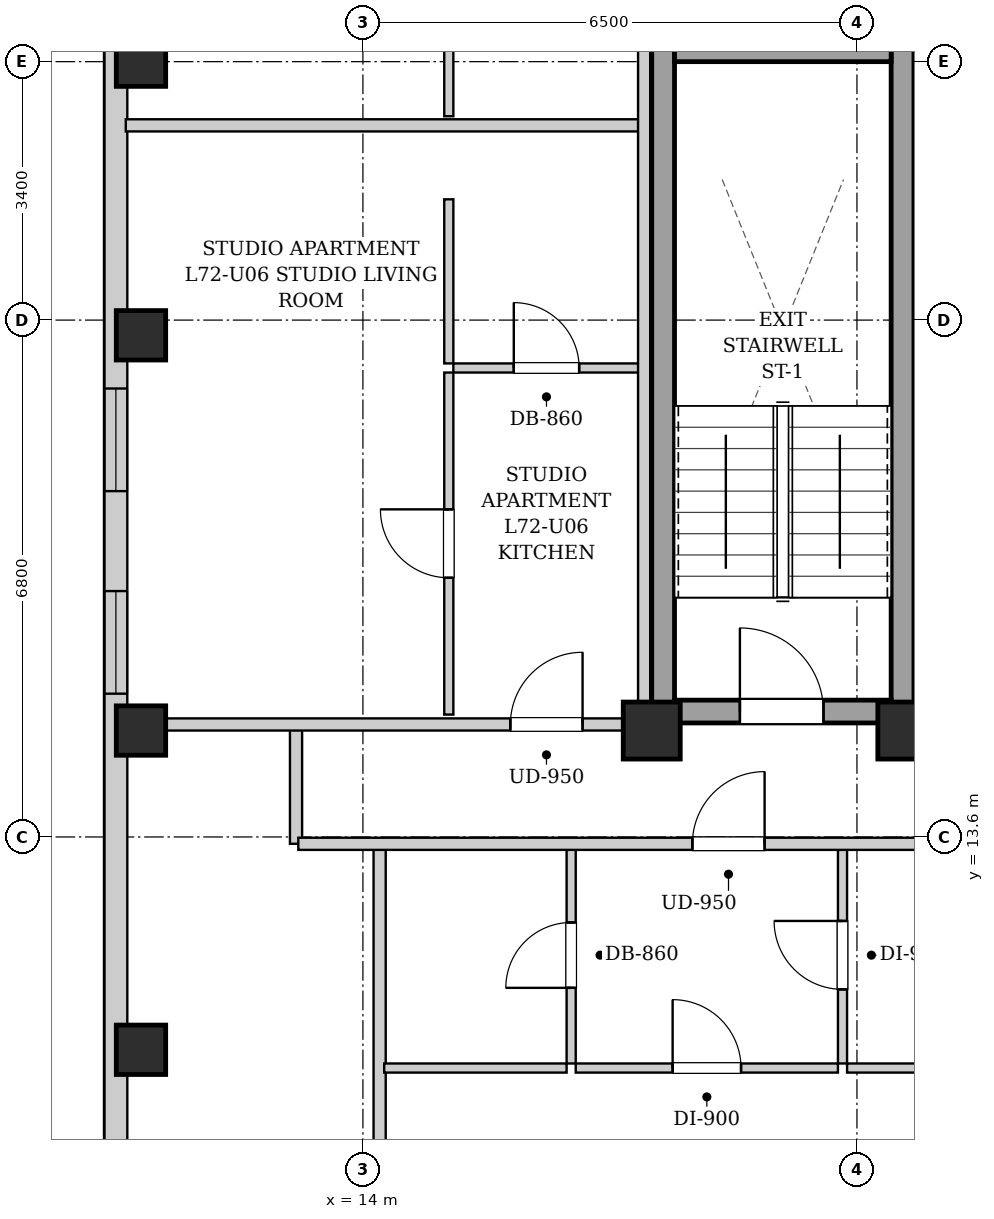
"""IFC4 building model, lengths in metres.
Left out: names, types, materials, properties, quantities, classifications, styles, units other than length and angle.
Written with IfcOpenShell. Run it as: python <this file> out.ifc"""

import sys

from ifc_helpers import new_model, si_unit, direction, frame, frame_2d, origin, origin_2d, place, context, subcontext, project, spatial, rectangle, extrude, element, fill, save


model = new_model("IFC4")
c1 = context("Model", 3, precision=1e-05, world=origin(), true_north=direction((0.0, 1.0)))
c2 = subcontext(c1, "Body", "Model", "MODEL_VIEW")
j1 = project(units=[si_unit("LENGTHUNIT", "METRE"), si_unit("PLANEANGLEUNIT", "RADIAN")], contexts=[c1])
p1 = place(None, origin())
s1 = spatial("IfcSite", under=j1, at=p1, CompositionType="ELEMENT")
p2 = place(p1, origin())
s2 = spatial("IfcBuilding", under=s1, at=p2, CompositionType="ELEMENT")
p3 = place(p2, frame((0.0, 0.0, 247.9)))
s3 = spatial("IfcBuildingStorey", under=s2, at=p3, CompositionType="ELEMENT", Elevation=247.9)
for number, where, z_axis, x_axis in (
    (1, (11.08, 10.8, 0.0), (0.0, 0.0, 1.0), (1.0, 0.0, 0.0)),
    (2, (11.08, 15.0, 0.0), (0.0, 0.0, 1.0), (1.0, 0.0, 0.0)),
    (3, (11.08, 20.2, 0.0), (0.0, 0.0, 1.0), (1.0, 0.0, 0.0)),
    (4, (11.08, 23.8, 0.0), (0.0, 0.0, 1.0), (1.0, 0.0, 0.0)),
):
    element("IfcColumn", number, at=place(p3, frame(where, z_axis=z_axis, x_axis=x_axis)), inside=s3, PredefinedType="COLUMN", context=c2, shape_type="SweptSolid", body=[
        extrude(rectangle(XDim=0.65, YDim=0.65, at=origin_2d()), origin(), (0.0, 0.0, 1.0), 3.4),
    ])
for number, where, z_axis, x_axis in (
    (5, (17.8, 15.0, 0.0), (0.0, 0.0, 1.0), (1.0, 0.0, 0.0)),
    (6, (21.15, 15.0, 0.0), (0.0, 0.0, 1.0), (1.0, 0.0, 0.0)),
):
    element("IfcColumn", number, at=place(p3, frame(where, z_axis=z_axis, x_axis=x_axis)), inside=s3, PredefinedType="COLUMN", context=c2, shape_type="SweptSolid", body=[
        extrude(rectangle(XDim=0.75, YDim=0.75, at=origin_2d()), origin(), (0.0, 0.0, 1.0), 3.4),
    ])
p4 = place(p3, frame((10.75, 6.3, 0.0), z_axis=(0.0, 0.0, 1.0), x_axis=(0.0, 1.0, 0.0)))
e7 = element("IfcWall", 7, at=p4, inside=s3, PredefinedType="SOLIDWALL", context=c2, shape_type="SweptSolid", body=[
    extrude(rectangle(XDim=31.4, YDim=0.3, at=frame_2d((15.7, 0.0))), origin(), (0.0, 0.0, 1.0), 3.14),
])
p5 = place(p4, frame((28.546, 0.0, 0.55)))
e8 = element("IfcOpeningElement", 8, at=p5, cuts=e7, PredefinedType="OPENING", context=c2, shape_type="SweptSolid", body=[
    extrude(rectangle(XDim=1.35, YDim=1.2, at=frame_2d((0.675, 0.6))), frame((0.0, 0.16, 0.0), z_axis=(0.0, -1.0, 0.0), x_axis=(1.0, 0.0, 0.0)), (0.0, 0.0, 1.0), 0.32),
])
p6 = place(p4, frame((11.85, 0.0, 0.55)))
e9 = element("IfcOpeningElement", 9, at=p6, cuts=e7, PredefinedType="OPENING", context=c2, shape_type="SweptSolid", body=[
    extrude(rectangle(XDim=1.35, YDim=1.2, at=frame_2d((0.675, 0.6))), frame((0.0, 0.16, 0.0), z_axis=(0.0, -1.0, 0.0), x_axis=(1.0, 0.0, 0.0)), (0.0, 0.0, 1.0), 0.32),
])
p7 = place(p4, frame((9.185, 0.0, 0.55)))
e10 = element("IfcOpeningElement", 10, at=p7, cuts=e7, PredefinedType="OPENING", context=c2, shape_type="SweptSolid", body=[
    extrude(rectangle(XDim=1.35, YDim=1.2, at=frame_2d((0.675, 0.6))), frame((0.0, 0.16, 0.0), z_axis=(0.0, -1.0, 0.0), x_axis=(1.0, 0.0, 0.0)), (0.0, 0.0, 1.0), 0.32),
])
p8 = place(p4, frame((19.006, 0.0, 0.55)))
e11 = element("IfcOpeningElement", 11, at=p8, cuts=e7, PredefinedType="OPENING", context=c2, shape_type="SweptSolid", body=[
    extrude(rectangle(XDim=1.35, YDim=1.2, at=frame_2d((0.675, 0.6))), frame((0.0, 0.16, 0.0), z_axis=(0.0, -1.0, 0.0), x_axis=(1.0, 0.0, 0.0)), (0.0, 0.0, 1.0), 0.32),
])
p9 = place(p4, frame((20.616, 0.0, 0.55)))
e12 = element("IfcOpeningElement", 12, at=p9, cuts=e7, PredefinedType="OPENING", context=c2, shape_type="SweptSolid", body=[
    extrude(rectangle(XDim=1.35, YDim=1.2, at=frame_2d((0.675, 0.6))), frame((0.0, 0.16, 0.0), z_axis=(0.0, -1.0, 0.0), x_axis=(1.0, 0.0, 0.0)), (0.0, 0.0, 1.0), 0.32),
])
for number, where, z_axis, x_axis in (
    (13, (17.95, 15.1, 0.0), (0.0, 0.0, 1.0), (0.0, 1.0, 0.0)),
    (14, (21.1, 15.1, 0.0), (0.0, 0.0, 1.0), (0.0, 1.0, 0.0)),
):
    element("IfcWall", number, at=place(p3, frame(where, z_axis=z_axis, x_axis=x_axis)), inside=s3, PredefinedType="SHEAR", context=c2, shape_type="SweptSolid", body=[
        extrude(rectangle(XDim=9.0, YDim=0.3, at=frame_2d((4.5, 0.0))), origin(), (0.0, 0.0, 1.0), 3.14),
    ])
p10 = place(p3, frame((18.1, 23.95, 0.0), z_axis=(0.0, 0.0, 1.0), x_axis=(1.0, 0.0, 0.0)))
e15 = element("IfcWall", 15, at=p10, inside=s3, PredefinedType="SHEAR", context=c2, shape_type="SweptSolid", body=[
    extrude(rectangle(XDim=2.85, YDim=0.3, at=frame_2d((1.425, 0.0))), origin(), (0.0, 0.0, 1.0), 3.14),
])
p11 = place(p3, frame((18.1, 15.25, 0.0), z_axis=(0.0, 0.0, 1.0), x_axis=(1.0, 0.0, 0.0)))
e16 = element("IfcWall", 16, at=p11, inside=s3, PredefinedType="SHEAR", context=c2, shape_type="SweptSolid", body=[
    extrude(rectangle(XDim=2.85, YDim=0.3, at=frame_2d((1.425, 0.0))), origin(), (0.0, 0.0, 1.0), 3.14),
])
p12 = place(p11, frame((0.86, 0.0, 0.0)))
e17 = element("IfcOpeningElement", 17, at=p12, cuts=e16, PredefinedType="OPENING", context=c2, shape_type="SweptSolid", body=[
    extrude(rectangle(XDim=1.1, YDim=2.05, at=frame_2d((0.55, 1.025))), frame((0.0, 0.16, 0.0), z_axis=(0.0, -1.0, 0.0), x_axis=(1.0, 0.0, 0.0)), (0.0, 0.0, 1.0), 0.32),
])
p13 = place(p3, frame((13.12, 13.51, 0.0), z_axis=(0.0, 0.0, 1.0), x_axis=(0.0, 1.0, 0.0)))
e18 = element("IfcWall", 18, at=p13, inside=s3, PredefinedType="PARTITIONING", context=c2, shape_type="SweptSolid", body=[
    extrude(rectangle(XDim=1.58, YDim=0.16, at=frame_2d((0.79, 0.0))), origin(), (0.0, 0.0, 1.0), 3.14),
])
p14 = place(p3, frame((14.22, 4.08, 0.0), z_axis=(0.0, 0.0, 1.0), x_axis=(0.0, 1.0, 0.0)))
e19 = element("IfcWall", 19, at=p14, inside=s3, PredefinedType="PARTITIONING", context=c2, shape_type="SweptSolid", body=[
    extrude(rectangle(XDim=9.39, YDim=0.16, at=frame_2d((4.695, 0.0))), origin(), (0.0, 0.0, 1.0), 3.14),
])
p15 = place(p3, frame((16.74, 10.62, 0.0), z_axis=(0.0, 0.0, 1.0), x_axis=(0.0, 1.0, 0.0)))
e20 = element("IfcWall", 20, at=p15, inside=s3, PredefinedType="PARTITIONING", context=c2, shape_type="SweptSolid", body=[
    extrude(rectangle(XDim=2.85, YDim=0.12, at=frame_2d((1.425, 0.0))), origin(), (0.0, 0.0, 1.0), 3.14),
])
p16 = place(p15, frame((0.995, 0.0, 0.0)))
e21 = element("IfcOpeningElement", 21, at=p16, cuts=e20, PredefinedType="OPENING", context=c2, shape_type="SweptSolid", body=[
    extrude(rectangle(XDim=0.86, YDim=2.05, at=frame_2d((0.43, 1.025))), frame((0.0, 0.07, 0.0), z_axis=(0.0, -1.0, 0.0), x_axis=(1.0, 0.0, 0.0)), (0.0, 0.0, 1.0), 0.14),
])
p17 = place(p3, frame((14.28, 10.56, 0.0), z_axis=(0.0, 0.0, 1.0), x_axis=(1.0, 0.0, 0.0)))
e22 = element("IfcWall", 22, at=p17, inside=s3, PredefinedType="PARTITIONING", context=c2, shape_type="SweptSolid", body=[
    extrude(rectangle(XDim=2.4, YDim=0.12, at=frame_2d((1.2, 0.0))), origin(), (0.0, 0.0, 1.0), 3.14),
])
p18 = place(p3, frame((20.31, 10.62, 0.0), z_axis=(0.0, 0.0, 1.0), x_axis=(0.0, 1.0, 0.0)))
e23 = element("IfcWall", 23, at=p18, inside=s3, PredefinedType="PARTITIONING", context=c2, shape_type="SweptSolid", body=[
    extrude(rectangle(XDim=2.85, YDim=0.12, at=frame_2d((1.425, 0.0))), origin(), (0.0, 0.0, 1.0), 3.14),
])
p19 = place(p18, frame((0.975, 0.0, 0.0)))
e24 = element("IfcOpeningElement", 24, at=p19, cuts=e23, PredefinedType="OPENING", context=c2, shape_type="SweptSolid", body=[
    extrude(rectangle(XDim=0.9, YDim=2.05, at=frame_2d((0.45, 1.025))), frame((0.0, 0.07, 0.0), z_axis=(0.0, -1.0, 0.0), x_axis=(1.0, 0.0, 0.0)), (0.0, 0.0, 1.0), 0.14),
])
p20 = place(p3, frame((16.8, 10.56, 0.0), z_axis=(0.0, 0.0, 1.0), x_axis=(1.0, 0.0, 0.0)))
e25 = element("IfcWall", 25, at=p20, inside=s3, PredefinedType="PARTITIONING", context=c2, shape_type="SweptSolid", body=[
    extrude(rectangle(XDim=3.45, YDim=0.12, at=frame_2d((1.725, 0.0))), origin(), (0.0, 0.0, 1.0), 3.14),
])
p21 = place(p20, frame((1.275, 0.0, 0.0)))
e26 = element("IfcOpeningElement", 26, at=p21, cuts=e25, PredefinedType="OPENING", context=c2, shape_type="SweptSolid", body=[
    extrude(rectangle(XDim=0.9, YDim=2.05, at=frame_2d((0.45, 1.025))), frame((0.0, 0.07, 0.0), z_axis=(0.0, -1.0, 0.0), x_axis=(1.0, 0.0, 0.0)), (0.0, 0.0, 1.0), 0.14),
])
p22 = place(p3, frame((20.37, 10.56, 0.0), z_axis=(0.0, 0.0, 1.0), x_axis=(1.0, 0.0, 0.0)))
e27 = element("IfcWall", 27, at=p22, inside=s3, PredefinedType="PARTITIONING", context=c2, shape_type="SweptSolid", body=[
    extrude(rectangle(XDim=2.75, YDim=0.12, at=frame_2d((1.375, 0.0))), origin(), (0.0, 0.0, 1.0), 3.14),
])
p23 = place(p22, frame((0.925, 0.0, 0.0)))
e28 = element("IfcOpeningElement", 28, at=p23, cuts=e27, PredefinedType="OPENING", context=c2, shape_type="SweptSolid", body=[
    extrude(rectangle(XDim=0.9, YDim=2.05, at=frame_2d((0.45, 1.025))), frame((0.0, 0.07, 0.0), z_axis=(0.0, -1.0, 0.0), x_axis=(1.0, 0.0, 0.0)), (0.0, 0.0, 1.0), 0.14),
])
p24 = place(p3, frame((10.88, 15.08, 0.0), z_axis=(0.0, 0.0, 1.0), x_axis=(1.0, 0.0, 0.0)))
e29 = element("IfcWall", 29, at=p24, inside=s3, PredefinedType="PARTITIONING", context=c2, shape_type="SweptSolid", body=[
    extrude(rectangle(XDim=6.88, YDim=0.16, at=frame_2d((3.44, 0.0))), origin(), (0.0, 0.0, 1.0), 2.668),
])
p25 = place(p24, frame((5.06, 0.0, 0.0)))
e30 = element("IfcOpeningElement", 30, at=p25, cuts=e29, PredefinedType="OPENING", context=c2, shape_type="SweptSolid", body=[
    extrude(rectangle(XDim=0.95, YDim=2.1, at=frame_2d((0.475, 1.05))), frame((0.0, 0.09, 0.0), z_axis=(0.0, -1.0, 0.0), x_axis=(1.0, 0.0, 0.0)), (0.0, 0.0, 1.0), 0.18),
])
p26 = place(p3, frame((10.88, 22.962, 0.0), z_axis=(0.0, 0.0, 1.0), x_axis=(1.0, 0.0, 0.0)))
e31 = element("IfcWall", 31, at=p26, inside=s3, PredefinedType="PARTITIONING", context=c2, shape_type="SweptSolid", body=[
    extrude(rectangle(XDim=6.76, YDim=0.16, at=frame_2d((3.38, 0.0))), origin(), (0.0, 0.0, 1.0), 3.14),
])
p27 = place(p3, frame((15.19, 19.77, 0.0), z_axis=(0.0, 0.0, 1.0), x_axis=(1.0, 0.0, 0.0)))
e32 = element("IfcWall", 32, at=p27, inside=s3, PredefinedType="PARTITIONING", context=c2, shape_type="SweptSolid", body=[
    extrude(rectangle(XDim=2.45, YDim=0.12, at=frame_2d((1.225, 0.0))), origin(), (0.0, 0.0, 1.0), 3.14),
])
p28 = place(p27, frame((0.795, 0.0, 0.0)))
e33 = element("IfcOpeningElement", 33, at=p28, cuts=e32, PredefinedType="OPENING", context=c2, shape_type="SweptSolid", body=[
    extrude(rectangle(XDim=0.86, YDim=2.05, at=frame_2d((0.43, 1.025))), frame((0.0, 0.07, 0.0), z_axis=(0.0, -1.0, 0.0), x_axis=(1.0, 0.0, 0.0)), (0.0, 0.0, 1.0), 0.14),
])
p29 = place(p3, frame((15.13, 19.83, 0.0), z_axis=(0.0, 0.0, 1.0), x_axis=(0.0, 1.0, 0.0)))
e34 = element("IfcWall", 34, at=p29, inside=s3, PredefinedType="PARTITIONING", context=c2, shape_type="SweptSolid", body=[
    extrude(rectangle(XDim=2.159, YDim=0.12, at=frame_2d((1.08, 0.0))), origin(), (0.0, 0.0, 1.0), 3.14),
])
p30 = place(p3, frame((15.13, 15.21, 0.0), z_axis=(0.0, 0.0, 1.0), x_axis=(0.0, 1.0, 0.0)))
e35 = element("IfcWall", 35, at=p30, inside=s3, PredefinedType="PARTITIONING", context=c2, shape_type="SweptSolid", body=[
    extrude(rectangle(XDim=4.5, YDim=0.12, at=frame_2d((2.25, 0.0))), origin(), (0.0, 0.0, 1.0), 3.14),
])
p31 = place(p30, frame((1.8, 0.0, 0.0)))
e36 = element("IfcOpeningElement", 36, at=p31, cuts=e35, PredefinedType="OPENING", context=c2, shape_type="SweptSolid", body=[
    extrude(rectangle(XDim=0.9, YDim=2.05, at=frame_2d((0.45, 1.025))), frame((0.0, 0.07, 0.0), z_axis=(0.0, -1.0, 0.0), x_axis=(1.0, 0.0, 0.0)), (0.0, 0.0, 1.0), 0.14),
])
p32 = place(p3, frame((15.13, 23.082, 0.0), z_axis=(0.0, 0.0, 1.0), x_axis=(0.0, 1.0, 0.0)))
e37 = element("IfcWall", 37, at=p32, inside=s3, PredefinedType="PARTITIONING", context=c2, shape_type="SweptSolid", body=[
    extrude(rectangle(XDim=1.85, YDim=0.12, at=frame_2d((0.925, 0.0))), origin(), (0.0, 0.0, 1.0), 3.14),
])
p33 = place(p3, frame((13.15, 13.51, 0.0), z_axis=(0.0, 0.0, 1.0), x_axis=(1.0, 0.0, 0.0)))
e38 = element("IfcWall", 38, at=p33, inside=s3, PredefinedType="PARTITIONING", context=c2, shape_type="SweptSolid", body=[
    extrude(rectangle(XDim=24.6, YDim=0.16, at=frame_2d((12.3, 0.0))), origin(), (0.0, 0.0, 1.0), 3.14),
])
p34 = place(p33, frame((5.185, 0.0, 0.0)))
e39 = element("IfcOpeningElement", 39, at=p34, cuts=e38, PredefinedType="OPENING", context=c2, shape_type="SweptSolid", body=[
    extrude(rectangle(XDim=0.95, YDim=2.1, at=frame_2d((0.475, 1.05))), frame((0.0, 0.09, 0.0), z_axis=(0.0, -1.0, 0.0), x_axis=(1.0, 0.0, 0.0)), (0.0, 0.0, 1.0), 0.18),
])
p35 = place(p33, frame((13.503, 0.0, 0.0)))
e40 = element("IfcOpeningElement", 40, at=p35, cuts=e38, PredefinedType="OPENING", context=c2, shape_type="SweptSolid", body=[
    extrude(rectangle(XDim=0.95, YDim=2.1, at=frame_2d((0.475, 1.05))), frame((0.0, 0.09, 0.0), z_axis=(0.0, -1.0, 0.0), x_axis=(1.0, 0.0, 0.0)), (0.0, 0.0, 1.0), 0.18),
])
p36 = place(p33, frame((20.585, 0.0, 0.0)))
e41 = element("IfcOpeningElement", 41, at=p36, cuts=e38, PredefinedType="OPENING", context=c2, shape_type="SweptSolid", body=[
    extrude(rectangle(XDim=0.95, YDim=2.1, at=frame_2d((0.475, 1.05))), frame((0.0, 0.09, 0.0), z_axis=(0.0, -1.0, 0.0), x_axis=(1.0, 0.0, 0.0)), (0.0, 0.0, 1.0), 0.18),
])
p37 = place(p3, frame((17.7, 15.02, 0.0), z_axis=(0.0, 0.0, 1.0), x_axis=(0.0, 1.0, 0.0)))
e42 = element("IfcWall", 42, at=p37, inside=s3, PredefinedType="PARTITIONING", context=c2, shape_type="SweptSolid", body=[
    extrude(rectangle(XDim=13.98, YDim=0.16, at=frame_2d((6.99, 0.0))), origin(), (0.0, 0.0, 1.0), 2.475),
])
p38 = place(p12, origin())
e43 = element("IfcDoor", 43, at=p38, inside=s3, OperationType="SINGLE_SWING_LEFT", PredefinedType="DOOR", context=c2, shape_type="SweptSolid", body=[
    extrude(rectangle(XDim=1.1, YDim=2.05, at=frame_2d((0.55, 1.025))), frame((0.0, 0.025, 0.0), z_axis=(0.0, -1.0, 0.0), x_axis=(1.0, 0.0, 0.0)), (0.0, 0.0, 1.0), 0.05),
])
fill(e17, e43)
p39 = place(p16, origin())
e44 = element("IfcDoor", 44, at=p39, inside=s3, OperationType="SINGLE_SWING_LEFT", PredefinedType="DOOR", context=c2, shape_type="SweptSolid", body=[
    extrude(rectangle(XDim=0.86, YDim=2.05, at=frame_2d((0.43, 1.025))), frame((0.0, 0.025, 0.0), z_axis=(0.0, -1.0, 0.0), x_axis=(1.0, 0.0, 0.0)), (0.0, 0.0, 1.0), 0.05),
])
fill(e21, e44)
p40 = place(p19, origin())
e45 = element("IfcDoor", 45, at=p40, inside=s3, OperationType="SINGLE_SWING_RIGHT", PredefinedType="DOOR", context=c2, shape_type="SweptSolid", body=[
    extrude(rectangle(XDim=0.9, YDim=2.05, at=frame_2d((0.45, 1.025))), frame((0.0, 0.025, 0.0), z_axis=(0.0, -1.0, 0.0), x_axis=(1.0, 0.0, 0.0)), (0.0, 0.0, 1.0), 0.05),
])
fill(e24, e45)
p41 = place(p21, origin())
e46 = element("IfcDoor", 46, at=p41, inside=s3, OperationType="SINGLE_SWING_LEFT", PredefinedType="DOOR", context=c2, shape_type="SweptSolid", body=[
    extrude(rectangle(XDim=0.9, YDim=2.05, at=frame_2d((0.45, 1.025))), frame((0.0, 0.025, 0.0), z_axis=(0.0, -1.0, 0.0), x_axis=(1.0, 0.0, 0.0)), (0.0, 0.0, 1.0), 0.05),
])
fill(e26, e46)
p42 = place(p25, origin())
e47 = element("IfcDoor", 47, at=p42, inside=s3, OperationType="SINGLE_SWING_RIGHT", PredefinedType="DOOR", context=c2, shape_type="SweptSolid", body=[
    extrude(rectangle(XDim=0.95, YDim=2.1, at=frame_2d((0.475, 1.05))), frame((0.0, 0.025, 0.0), z_axis=(0.0, -1.0, 0.0), x_axis=(1.0, 0.0, 0.0)), (0.0, 0.0, 1.0), 0.05),
])
fill(e30, e47)
p43 = place(p28, origin())
e48 = element("IfcDoor", 48, at=p43, inside=s3, OperationType="SINGLE_SWING_LEFT", PredefinedType="DOOR", context=c2, shape_type="SweptSolid", body=[
    extrude(rectangle(XDim=0.86, YDim=2.05, at=frame_2d((0.43, 1.025))), frame((0.0, 0.025, 0.0), z_axis=(0.0, -1.0, 0.0), x_axis=(1.0, 0.0, 0.0)), (0.0, 0.0, 1.0), 0.05),
])
fill(e33, e48)
p44 = place(p31, origin())
e49 = element("IfcDoor", 49, at=p44, inside=s3, OperationType="SINGLE_SWING_RIGHT", PredefinedType="DOOR", context=c2, shape_type="SweptSolid", body=[
    extrude(rectangle(XDim=0.9, YDim=2.05, at=frame_2d((0.45, 1.025))), frame((0.0, 0.025, 0.0), z_axis=(0.0, -1.0, 0.0), x_axis=(1.0, 0.0, 0.0)), (0.0, 0.0, 1.0), 0.05),
])
fill(e36, e49)
p45 = place(p34, origin())
e50 = element("IfcDoor", 50, at=p45, inside=s3, OperationType="SINGLE_SWING_RIGHT", PredefinedType="DOOR", context=c2, shape_type="SweptSolid", body=[
    extrude(rectangle(XDim=0.95, YDim=2.1, at=frame_2d((0.475, 1.05))), frame((0.0, 0.025, 0.0), z_axis=(0.0, -1.0, 0.0), x_axis=(1.0, 0.0, 0.0)), (0.0, 0.0, 1.0), 0.05),
])
fill(e39, e50)
p46 = place(p6, origin())
e51 = element("IfcWindow", 51, at=p46, inside=s3, PartitioningType="SINGLE_PANEL", PredefinedType="WINDOW", context=c2, shape_type="SweptSolid", body=[
    extrude(rectangle(XDim=1.35, YDim=1.2, at=frame_2d((0.675, 0.6))), frame((0.0, 0.03, 0.0), z_axis=(0.0, -1.0, 0.0), x_axis=(1.0, 0.0, 0.0)), (0.0, 0.0, 1.0), 0.06),
])
fill(e9, e51)
p47 = place(p7, origin())
e52 = element("IfcWindow", 52, at=p47, inside=s3, PartitioningType="SINGLE_PANEL", PredefinedType="WINDOW", context=c2, shape_type="SweptSolid", body=[
    extrude(rectangle(XDim=1.35, YDim=1.2, at=frame_2d((0.675, 0.6))), frame((0.0, 0.03, 0.0), z_axis=(0.0, -1.0, 0.0), x_axis=(1.0, 0.0, 0.0)), (0.0, 0.0, 1.0), 0.06),
])
fill(e10, e52)
save(model, sys.argv[1])
